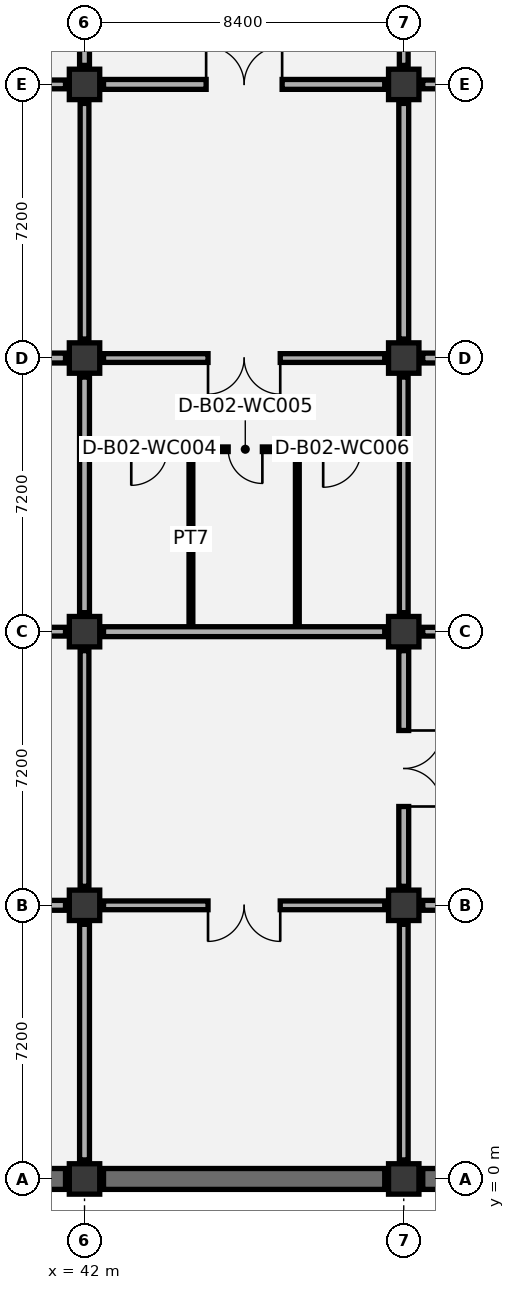
"""IFC4 building model, lengths in metres.
Left out: names, types, materials, properties, quantities, classifications, styles, units other than length and angle.
Written with IfcOpenShell. Run it as: python <this file> out.ifc"""

import sys

from ifc_helpers import new_model, si_unit, direction, frame, frame_2d, origin, origin_2d, place, context, subcontext, project, spatial, rectangle, extrude, element, fill, save


model = new_model("IFC4")
c1 = context("Model", 3, precision=1e-05, world=origin(), true_north=direction((0.0, 1.0)))
c2 = subcontext(c1, "Body", "Model", "MODEL_VIEW")
j1 = project(units=[si_unit("LENGTHUNIT", "METRE"), si_unit("PLANEANGLEUNIT", "RADIAN")], contexts=[c1])
p1 = place(None, origin())
s1 = spatial("IfcSite", under=j1, at=p1, CompositionType="ELEMENT")
p2 = place(p1, origin())
s2 = spatial("IfcBuilding", under=s1, at=p2, CompositionType="ELEMENT")
p3 = place(p2, frame((0.0, 0.0, -9.6)))
s3 = spatial("IfcBuildingStorey", under=s2, at=p3, CompositionType="ELEMENT", Elevation=-9.6)
for number, where, z_axis, x_axis in (
    (1, (42.0, 0.0, 0.0), (0.0, 0.0, 1.0), (1.0, 0.0, 0.0)),
    (2, (42.0, 7.2, 0.0), (0.0, 0.0, 1.0), (1.0, 0.0, 0.0)),
    (3, (42.0, 14.4, 0.0), (0.0, 0.0, 1.0), (1.0, 0.0, 0.0)),
    (4, (42.0, 21.6, 0.0), (0.0, 0.0, 1.0), (1.0, 0.0, 0.0)),
    (5, (42.0, 28.8, 0.0), (0.0, 0.0, 1.0), (1.0, 0.0, 0.0)),
    (6, (50.4, 0.0, 0.0), (0.0, 0.0, 1.0), (1.0, 0.0, 0.0)),
    (7, (50.4, 7.2, 0.0), (0.0, 0.0, 1.0), (1.0, 0.0, 0.0)),
    (8, (50.4, 14.4, 0.0), (0.0, 0.0, 1.0), (1.0, 0.0, 0.0)),
    (9, (50.4, 21.6, 0.0), (0.0, 0.0, 1.0), (1.0, 0.0, 0.0)),
    (10, (50.4, 28.8, 0.0), (0.0, 0.0, 1.0), (1.0, 0.0, 0.0)),
):
    element("IfcColumn", number, at=place(p3, frame(where, z_axis=z_axis, x_axis=x_axis)), inside=s3, PredefinedType="COLUMN", context=c2, shape_type="SweptSolid", body=[
        extrude(rectangle(XDim=0.8, YDim=0.8, at=origin_2d()), origin(), (0.0, 0.0, 1.0), 4.8),
    ])
for number, where, z_axis, x_axis in (
    (11, (34.1, 0.0, 0.0), (0.0, 0.0, 1.0), (1.0, 0.0, 0.0)),
    (12, (42.5, 0.0, 0.0), (0.0, 0.0, 1.0), (1.0, 0.0, 0.0)),
):
    element("IfcWall", number, at=place(p3, frame(where, z_axis=z_axis, x_axis=x_axis)), inside=s3, PredefinedType="USERDEFINED", context=c2, shape_type="SweptSolid", body=[
        extrude(rectangle(XDim=7.4, YDim=0.55, at=frame_2d((3.7, 0.0))), origin(), (0.0, 0.0, 1.0), 4.4),
    ])
p4 = place(p3, frame((50.9, 0.0, 0.0), z_axis=(0.0, 0.0, 1.0), x_axis=(1.0, 0.0, 0.0)))
e13 = element("IfcWall", 13, at=p4, inside=s3, PredefinedType="USERDEFINED", context=c2, shape_type="SweptSolid", body=[
    extrude(rectangle(XDim=7.4, YDim=0.55, at=frame_2d((3.7, 0.0))), origin(), (0.0, 0.0, 1.0), 4.4),
])
p5 = place(p3, frame((42.15, 19.2, 0.0), z_axis=(0.0, 0.0, 1.0), x_axis=(1.0, 0.0, 0.0)))
e14 = element("IfcWall", 14, at=p5, inside=s3, PredefinedType="PARTITIONING", context=c2, shape_type="SweptSolid", body=[
    extrude(rectangle(XDim=8.1, YDim=0.12, at=frame_2d((4.05, 0.0))), origin(), (0.0, 0.0, 1.0), 4.4),
])
p6 = place(p5, frame((1.08, 0.0, 0.0)))
e15 = element("IfcOpeningElement", 15, at=p6, cuts=e14, PredefinedType="OPENING", context=c2, shape_type="SweptSolid", body=[
    extrude(rectangle(XDim=0.95, YDim=2.1, at=frame_2d((0.475, 1.05))), frame((0.0, 0.07, 0.0), z_axis=(0.0, -1.0, 0.0), x_axis=(1.0, 0.0, 0.0)), (0.0, 0.0, 1.0), 0.14),
])
p7 = place(p5, frame((3.63, 0.0, 0.0)))
e16 = element("IfcOpeningElement", 16, at=p7, cuts=e14, PredefinedType="OPENING", context=c2, shape_type="SweptSolid", body=[
    extrude(rectangle(XDim=0.9, YDim=2.1, at=frame_2d((0.45, 1.05))), frame((0.0, 0.07, 0.0), z_axis=(0.0, -1.0, 0.0), x_axis=(1.0, 0.0, 0.0)), (0.0, 0.0, 1.0), 0.14),
])
p8 = place(p5, frame((6.13, 0.0, 0.0)))
e17 = element("IfcOpeningElement", 17, at=p8, cuts=e14, PredefinedType="OPENING", context=c2, shape_type="SweptSolid", body=[
    extrude(rectangle(XDim=1.0, YDim=2.1, at=frame_2d((0.5, 1.05))), frame((0.0, 0.07, 0.0), z_axis=(0.0, -1.0, 0.0), x_axis=(1.0, 0.0, 0.0)), (0.0, 0.0, 1.0), 0.14),
])
for number, where, z_axis, x_axis in (
    (18, (44.8, 14.55, 0.0), (0.0, 0.0, 1.0), (0.0, 1.0, 0.0)),
    (19, (47.6, 14.55, 0.0), (0.0, 0.0, 1.0), (0.0, 1.0, 0.0)),
):
    element("IfcWall", number, at=place(p3, frame(where, z_axis=z_axis, x_axis=x_axis)), inside=s3, PredefinedType="PARTITIONING", context=c2, shape_type="SweptSolid", body=[
        extrude(rectangle(XDim=4.59, YDim=0.1, at=frame_2d((2.295, 0.0))), origin(), (0.0, 0.0, 1.0), 4.4),
    ])
p9 = place(p3, frame((42.0, 0.5, 0.0), z_axis=(0.0, 0.0, 1.0), x_axis=(0.0, 1.0, 0.0)))
e20 = element("IfcWall", 20, at=p9, inside=s3, PredefinedType="PARTITIONING", context=c2, shape_type="SweptSolid", body=[
    extrude(rectangle(XDim=6.2, YDim=0.26, at=frame_2d((3.1, 0.0))), origin(), (0.0, 0.0, 1.0), 3.595),
])
p10 = place(p3, frame((34.1, 7.2, 0.0), z_axis=(0.0, 0.0, 1.0), x_axis=(1.0, 0.0, 0.0)))
e21 = element("IfcWall", 21, at=p10, inside=s3, PredefinedType="PARTITIONING", context=c2, shape_type="SweptSolid", body=[
    extrude(rectangle(XDim=7.4, YDim=0.26, at=frame_2d((3.7, 0.0))), origin(), (0.0, 0.0, 1.0), 3.495),
])
p11 = place(p10, frame((2.75, 0.0, 0.0)))
e22 = element("IfcOpeningElement", 22, at=p11, cuts=e21, PredefinedType="OPENING", context=c2, shape_type="SweptSolid", body=[
    extrude(rectangle(XDim=1.9, YDim=2.3, at=frame_2d((0.95, 1.15))), frame((0.0, 0.14, 0.0), z_axis=(0.0, -1.0, 0.0), x_axis=(1.0, 0.0, 0.0)), (0.0, 0.0, 1.0), 0.28),
])
p12 = place(p3, frame((42.0, 7.7, 0.0), z_axis=(0.0, 0.0, 1.0), x_axis=(0.0, 1.0, 0.0)))
e23 = element("IfcWall", 23, at=p12, inside=s3, PredefinedType="PARTITIONING", context=c2, shape_type="SweptSolid", body=[
    extrude(rectangle(XDim=6.2, YDim=0.23, at=frame_2d((3.1, 0.0))), origin(), (0.0, 0.0, 1.0), 3.595),
])
p13 = place(p3, frame((34.1, 14.4, 0.0), z_axis=(0.0, 0.0, 1.0), x_axis=(1.0, 0.0, 0.0)))
e24 = element("IfcWall", 24, at=p13, inside=s3, PredefinedType="PARTITIONING", context=c2, shape_type="SweptSolid", body=[
    extrude(rectangle(XDim=7.4, YDim=0.23, at=frame_2d((3.7, 0.0))), origin(), (0.0, 0.0, 1.0), 3.495),
])
p14 = place(p13, frame((2.7, 0.0, 0.0)))
e25 = element("IfcOpeningElement", 25, at=p14, cuts=e24, PredefinedType="OPENING", context=c2, shape_type="SweptSolid", body=[
    extrude(rectangle(XDim=2.0, YDim=2.35, at=frame_2d((1.0, 1.175))), frame((0.0, 0.125, 0.0), z_axis=(0.0, -1.0, 0.0), x_axis=(1.0, 0.0, 0.0)), (0.0, 0.0, 1.0), 0.25),
])
p15 = place(p3, frame((42.0, 14.9, 0.0), z_axis=(0.0, 0.0, 1.0), x_axis=(0.0, 1.0, 0.0)))
e26 = element("IfcWall", 26, at=p15, inside=s3, PredefinedType="PARTITIONING", context=c2, shape_type="SweptSolid", body=[
    extrude(rectangle(XDim=6.2, YDim=0.26, at=frame_2d((3.1, 0.0))), origin(), (0.0, 0.0, 1.0), 3.595),
])
p16 = place(p3, frame((34.1, 21.6, 0.0), z_axis=(0.0, 0.0, 1.0), x_axis=(1.0, 0.0, 0.0)))
e27 = element("IfcWall", 27, at=p16, inside=s3, PredefinedType="PARTITIONING", context=c2, shape_type="SweptSolid", body=[
    extrude(rectangle(XDim=7.4, YDim=0.26, at=frame_2d((3.7, 0.0))), origin(), (0.0, 0.0, 1.0), 2.995),
])
p17 = place(p16, frame((2.75, 0.0, 0.0)))
e28 = element("IfcOpeningElement", 28, at=p17, cuts=e27, PredefinedType="OPENING", context=c2, shape_type="SweptSolid", body=[
    extrude(rectangle(XDim=1.9, YDim=2.3, at=frame_2d((0.95, 1.15))), frame((0.0, 0.14, 0.0), z_axis=(0.0, -1.0, 0.0), x_axis=(1.0, 0.0, 0.0)), (0.0, 0.0, 1.0), 0.28),
])
p18 = place(p3, frame((42.0, 22.1, 0.0), z_axis=(0.0, 0.0, 1.0), x_axis=(0.0, 1.0, 0.0)))
e29 = element("IfcWall", 29, at=p18, inside=s3, PredefinedType="PARTITIONING", context=c2, shape_type="SweptSolid", body=[
    extrude(rectangle(XDim=6.2, YDim=0.23, at=frame_2d((3.1, 0.0))), origin(), (0.0, 0.0, 1.0), 3.095),
])
p19 = place(p3, frame((34.1, 28.8, 0.0), z_axis=(0.0, 0.0, 1.0), x_axis=(1.0, 0.0, 0.0)))
e30 = element("IfcWall", 30, at=p19, inside=s3, PredefinedType="PARTITIONING", context=c2, shape_type="SweptSolid", body=[
    extrude(rectangle(XDim=7.4, YDim=0.23, at=frame_2d((3.7, 0.0))), origin(), (0.0, 0.0, 1.0), 3.9),
])
p20 = place(p19, frame((2.7, 0.0, 0.0)))
e31 = element("IfcOpeningElement", 31, at=p20, cuts=e30, PredefinedType="OPENING", context=c2, shape_type="SweptSolid", body=[
    extrude(rectangle(XDim=2.0, YDim=2.35, at=frame_2d((1.0, 1.175))), frame((0.0, 0.125, 0.0), z_axis=(0.0, -1.0, 0.0), x_axis=(1.0, 0.0, 0.0)), (0.0, 0.0, 1.0), 0.25),
])
p21 = place(p3, frame((42.0, 29.3, 0.0), z_axis=(0.0, 0.0, 1.0), x_axis=(0.0, 1.0, 0.0)))
e32 = element("IfcWall", 32, at=p21, inside=s3, PredefinedType="PARTITIONING", context=c2, shape_type="SweptSolid", body=[
    extrude(rectangle(XDim=6.2, YDim=0.26, at=frame_2d((3.1, 0.0))), origin(), (0.0, 0.0, 1.0), 3.095),
])
p22 = place(p21, frame((2.15, 0.0, 0.0)))
e33 = element("IfcOpeningElement", 33, at=p22, cuts=e32, PredefinedType="OPENING", context=c2, shape_type="SweptSolid", body=[
    extrude(rectangle(XDim=1.9, YDim=2.3, at=frame_2d((0.95, 1.15))), frame((0.0, 0.14, 0.0), z_axis=(0.0, -1.0, 0.0), x_axis=(1.0, 0.0, 0.0)), (0.0, 0.0, 1.0), 0.28),
])
p23 = place(p3, frame((50.4, 0.5, 0.0), z_axis=(0.0, 0.0, 1.0), x_axis=(0.0, 1.0, 0.0)))
e34 = element("IfcWall", 34, at=p23, inside=s3, PredefinedType="PARTITIONING", context=c2, shape_type="SweptSolid", body=[
    extrude(rectangle(XDim=6.2, YDim=0.23, at=frame_2d((3.1, 0.0))), origin(), (0.0, 0.0, 1.0), 3.595),
])
p24 = place(p3, frame((42.5, 7.2, 0.0), z_axis=(0.0, 0.0, 1.0), x_axis=(1.0, 0.0, 0.0)))
e35 = element("IfcWall", 35, at=p24, inside=s3, PredefinedType="PARTITIONING", context=c2, shape_type="SweptSolid", body=[
    extrude(rectangle(XDim=7.4, YDim=0.23, at=frame_2d((3.7, 0.0))), origin(), (0.0, 0.0, 1.0), 3.495),
])
p25 = place(p24, frame((2.75, 0.0, 0.0)))
e36 = element("IfcOpeningElement", 36, at=p25, cuts=e35, PredefinedType="OPENING", context=c2, shape_type="SweptSolid", body=[
    extrude(rectangle(XDim=1.9, YDim=2.3, at=frame_2d((0.95, 1.15))), frame((0.0, 0.125, 0.0), z_axis=(0.0, -1.0, 0.0), x_axis=(1.0, 0.0, 0.0)), (0.0, 0.0, 1.0), 0.25),
])
p26 = place(p3, frame((50.4, 7.7, 0.0), z_axis=(0.0, 0.0, 1.0), x_axis=(0.0, 1.0, 0.0)))
e37 = element("IfcWall", 37, at=p26, inside=s3, PredefinedType="PARTITIONING", context=c2, shape_type="SweptSolid", body=[
    extrude(rectangle(XDim=6.2, YDim=0.26, at=frame_2d((3.1, 0.0))), origin(), (0.0, 0.0, 1.0), 3.595),
])
p27 = place(p26, frame((2.1, 0.0, 0.0)))
e38 = element("IfcOpeningElement", 38, at=p27, cuts=e37, PredefinedType="OPENING", context=c2, shape_type="SweptSolid", body=[
    extrude(rectangle(XDim=2.0, YDim=2.35, at=frame_2d((1.0, 1.175))), frame((0.0, 0.14, 0.0), z_axis=(0.0, -1.0, 0.0), x_axis=(1.0, 0.0, 0.0)), (0.0, 0.0, 1.0), 0.28),
])
p28 = place(p3, frame((42.5, 14.4, 0.0), z_axis=(0.0, 0.0, 1.0), x_axis=(1.0, 0.0, 0.0)))
e39 = element("IfcWall", 39, at=p28, inside=s3, PredefinedType="PARTITIONING", context=c2, shape_type="SweptSolid", body=[
    extrude(rectangle(XDim=7.4, YDim=0.26, at=frame_2d((3.7, 0.0))), origin(), (0.0, 0.0, 1.0), 3.495),
])
p29 = place(p3, frame((50.4, 14.9, 0.0), z_axis=(0.0, 0.0, 1.0), x_axis=(0.0, 1.0, 0.0)))
e40 = element("IfcWall", 40, at=p29, inside=s3, PredefinedType="PARTITIONING", context=c2, shape_type="SweptSolid", body=[
    extrude(rectangle(XDim=6.2, YDim=0.23, at=frame_2d((3.1, 0.0))), origin(), (0.0, 0.0, 1.0), 3.595),
])
p30 = place(p3, frame((42.5, 21.6, 0.0), z_axis=(0.0, 0.0, 1.0), x_axis=(1.0, 0.0, 0.0)))
e41 = element("IfcWall", 41, at=p30, inside=s3, PredefinedType="PARTITIONING", context=c2, shape_type="SweptSolid", body=[
    extrude(rectangle(XDim=7.4, YDim=0.23, at=frame_2d((3.7, 0.0))), origin(), (0.0, 0.0, 1.0), 3.495),
])
p31 = place(p30, frame((2.75, 0.0, 0.0)))
e42 = element("IfcOpeningElement", 42, at=p31, cuts=e41, PredefinedType="OPENING", context=c2, shape_type="SweptSolid", body=[
    extrude(rectangle(XDim=1.9, YDim=2.3, at=frame_2d((0.95, 1.15))), frame((0.0, 0.125, 0.0), z_axis=(0.0, -1.0, 0.0), x_axis=(1.0, 0.0, 0.0)), (0.0, 0.0, 1.0), 0.25),
])
p32 = place(p3, frame((50.4, 22.1, 0.0), z_axis=(0.0, 0.0, 1.0), x_axis=(0.0, 1.0, 0.0)))
e43 = element("IfcWall", 43, at=p32, inside=s3, PredefinedType="PARTITIONING", context=c2, shape_type="SweptSolid", body=[
    extrude(rectangle(XDim=6.2, YDim=0.26, at=frame_2d((3.1, 0.0))), origin(), (0.0, 0.0, 1.0), 3.595),
])
p33 = place(p3, frame((42.5, 28.8, 0.0), z_axis=(0.0, 0.0, 1.0), x_axis=(1.0, 0.0, 0.0)))
e44 = element("IfcWall", 44, at=p33, inside=s3, PredefinedType="PARTITIONING", context=c2, shape_type="SweptSolid", body=[
    extrude(rectangle(XDim=7.4, YDim=0.26, at=frame_2d((3.7, 0.0))), origin(), (0.0, 0.0, 1.0), 3.495),
])
p34 = place(p33, frame((2.7, 0.0, 0.0)))
e45 = element("IfcOpeningElement", 45, at=p34, cuts=e44, PredefinedType="OPENING", context=c2, shape_type="SweptSolid", body=[
    extrude(rectangle(XDim=2.0, YDim=2.35, at=frame_2d((1.0, 1.175))), frame((0.0, 0.14, 0.0), z_axis=(0.0, -1.0, 0.0), x_axis=(1.0, 0.0, 0.0)), (0.0, 0.0, 1.0), 0.28),
])
p35 = place(p3, frame((50.4, 29.3, 0.0), z_axis=(0.0, 0.0, 1.0), x_axis=(0.0, 1.0, 0.0)))
e46 = element("IfcWall", 46, at=p35, inside=s3, PredefinedType="PARTITIONING", context=c2, shape_type="SweptSolid", body=[
    extrude(rectangle(XDim=6.2, YDim=0.23, at=frame_2d((3.1, 0.0))), origin(), (0.0, 0.0, 1.0), 3.595),
])
p36 = place(p35, frame((2.15, 0.0, 0.0)))
e47 = element("IfcOpeningElement", 47, at=p36, cuts=e46, PredefinedType="OPENING", context=c2, shape_type="SweptSolid", body=[
    extrude(rectangle(XDim=1.9, YDim=2.3, at=frame_2d((0.95, 1.15))), frame((0.0, 0.125, 0.0), z_axis=(0.0, -1.0, 0.0), x_axis=(1.0, 0.0, 0.0)), (0.0, 0.0, 1.0), 0.25),
])
p37 = place(p3, frame((50.9, 7.2, 0.0), z_axis=(0.0, 0.0, 1.0), x_axis=(1.0, 0.0, 0.0)))
e48 = element("IfcWall", 48, at=p37, inside=s3, PredefinedType="PARTITIONING", context=c2, shape_type="SweptSolid", body=[
    extrude(rectangle(XDim=7.4, YDim=0.26, at=frame_2d((3.7, 0.0))), origin(), (0.0, 0.0, 1.0), 3.495),
])
p38 = place(p37, frame((2.75, 0.0, 0.0)))
e49 = element("IfcOpeningElement", 49, at=p38, cuts=e48, PredefinedType="OPENING", context=c2, shape_type="SweptSolid", body=[
    extrude(rectangle(XDim=1.9, YDim=2.3, at=frame_2d((0.95, 1.15))), frame((0.0, 0.14, 0.0), z_axis=(0.0, -1.0, 0.0), x_axis=(1.0, 0.0, 0.0)), (0.0, 0.0, 1.0), 0.28),
])
p39 = place(p3, frame((50.9, 14.4, 0.0), z_axis=(0.0, 0.0, 1.0), x_axis=(1.0, 0.0, 0.0)))
e50 = element("IfcWall", 50, at=p39, inside=s3, PredefinedType="PARTITIONING", context=c2, shape_type="SweptSolid", body=[
    extrude(rectangle(XDim=7.4, YDim=0.23, at=frame_2d((3.7, 0.0))), origin(), (0.0, 0.0, 1.0), 3.495),
])
p40 = place(p39, frame((2.7, 0.0, 0.0)))
e51 = element("IfcOpeningElement", 51, at=p40, cuts=e50, PredefinedType="OPENING", context=c2, shape_type="SweptSolid", body=[
    extrude(rectangle(XDim=2.0, YDim=2.35, at=frame_2d((1.0, 1.175))), frame((0.0, 0.125, 0.0), z_axis=(0.0, -1.0, 0.0), x_axis=(1.0, 0.0, 0.0)), (0.0, 0.0, 1.0), 0.25),
])
p41 = place(p3, frame((50.9, 21.6, 0.0), z_axis=(0.0, 0.0, 1.0), x_axis=(1.0, 0.0, 0.0)))
e52 = element("IfcWall", 52, at=p41, inside=s3, PredefinedType="PARTITIONING", context=c2, shape_type="SweptSolid", body=[
    extrude(rectangle(XDim=7.4, YDim=0.26, at=frame_2d((3.7, 0.0))), origin(), (0.0, 0.0, 1.0), 3.495),
])
p42 = place(p41, frame((2.75, 0.0, 0.0)))
e53 = element("IfcOpeningElement", 53, at=p42, cuts=e52, PredefinedType="OPENING", context=c2, shape_type="SweptSolid", body=[
    extrude(rectangle(XDim=1.9, YDim=2.3, at=frame_2d((0.95, 1.15))), frame((0.0, 0.14, 0.0), z_axis=(0.0, -1.0, 0.0), x_axis=(1.0, 0.0, 0.0)), (0.0, 0.0, 1.0), 0.28),
])
p43 = place(p3, frame((50.9, 28.8, 0.0), z_axis=(0.0, 0.0, 1.0), x_axis=(1.0, 0.0, 0.0)))
e54 = element("IfcWall", 54, at=p43, inside=s3, PredefinedType="PARTITIONING", context=c2, shape_type="SweptSolid", body=[
    extrude(rectangle(XDim=7.4, YDim=0.23, at=frame_2d((3.7, 0.0))), origin(), (0.0, 0.0, 1.0), 3.495),
])
p44 = place(p43, frame((2.7, 0.0, 0.0)))
e55 = element("IfcOpeningElement", 55, at=p44, cuts=e54, PredefinedType="OPENING", context=c2, shape_type="SweptSolid", body=[
    extrude(rectangle(XDim=2.0, YDim=2.35, at=frame_2d((1.0, 1.175))), frame((0.0, 0.125, 0.0), z_axis=(0.0, -1.0, 0.0), x_axis=(1.0, 0.0, 0.0)), (0.0, 0.0, 1.0), 0.25),
])
p45 = place(p6, frame((0.95, 0.0, 0.0), z_axis=(0.0, 0.0, 1.0), x_axis=(-1.0, 0.0, 0.0)))
e56 = element("IfcDoor", 56, at=p45, inside=s3, OperationType="SINGLE_SWING_RIGHT", PredefinedType="DOOR", context=c2, shape_type="SweptSolid", body=[
    extrude(rectangle(XDim=0.95, YDim=2.1, at=frame_2d((0.475, 1.05))), frame((0.0, 0.025, 0.0), z_axis=(0.0, -1.0, 0.0), x_axis=(1.0, 0.0, 0.0)), (0.0, 0.0, 1.0), 0.05),
])
fill(e15, e56)
p46 = place(p7, frame((0.9, 0.0, 0.0), z_axis=(0.0, 0.0, 1.0), x_axis=(-1.0, 0.0, 0.0)))
e57 = element("IfcDoor", 57, at=p46, inside=s3, OperationType="SINGLE_SWING_LEFT", PredefinedType="DOOR", context=c2, shape_type="SweptSolid", body=[
    extrude(rectangle(XDim=0.9, YDim=2.1, at=frame_2d((0.45, 1.05))), frame((0.0, 0.025, 0.0), z_axis=(0.0, -1.0, 0.0), x_axis=(1.0, 0.0, 0.0)), (0.0, 0.0, 1.0), 0.05),
])
fill(e16, e57)
p47 = place(p8, frame((1.0, 0.0, 0.0), z_axis=(0.0, 0.0, 1.0), x_axis=(-1.0, 0.0, 0.0)))
e58 = element("IfcDoor", 58, at=p47, inside=s3, OperationType="SINGLE_SWING_RIGHT", PredefinedType="DOOR", context=c2, shape_type="SweptSolid", body=[
    extrude(rectangle(XDim=1.0, YDim=2.1, at=frame_2d((0.5, 1.05))), frame((0.0, 0.025, 0.0), z_axis=(0.0, -1.0, 0.0), x_axis=(1.0, 0.0, 0.0)), (0.0, 0.0, 1.0), 0.05),
])
fill(e17, e58)
p48 = place(p25, frame((1.9, 0.0, 0.0), z_axis=(0.0, 0.0, 1.0), x_axis=(-1.0, 0.0, 0.0)))
e59 = element("IfcDoor", 59, at=p48, inside=s3, OperationType="DOUBLE_DOOR_SINGLE_SWING", PredefinedType="DOOR", context=c2, shape_type="SweptSolid", body=[
    extrude(rectangle(XDim=1.9, YDim=2.3, at=frame_2d((0.95, 1.15))), frame((0.0, 0.025, 0.0), z_axis=(0.0, -1.0, 0.0), x_axis=(1.0, 0.0, 0.0)), (0.0, 0.0, 1.0), 0.05),
])
fill(e36, e59)
p49 = place(p27, frame((2.0, 0.0, 0.0), z_axis=(0.0, 0.0, 1.0), x_axis=(-1.0, 0.0, 0.0)))
e60 = element("IfcDoor", 60, at=p49, inside=s3, OperationType="DOUBLE_DOOR_SINGLE_SWING", PredefinedType="DOOR", context=c2, shape_type="SweptSolid", body=[
    extrude(rectangle(XDim=2.0, YDim=2.35, at=frame_2d((1.0, 1.175))), frame((0.0, 0.025, 0.0), z_axis=(0.0, -1.0, 0.0), x_axis=(1.0, 0.0, 0.0)), (0.0, 0.0, 1.0), 0.05),
])
fill(e38, e60)
p50 = place(p31, frame((1.9, 0.0, 0.0), z_axis=(0.0, 0.0, 1.0), x_axis=(-1.0, 0.0, 0.0)))
e61 = element("IfcDoor", 61, at=p50, inside=s3, OperationType="DOUBLE_DOOR_SINGLE_SWING", PredefinedType="DOOR", context=c2, shape_type="SweptSolid", body=[
    extrude(rectangle(XDim=1.9, YDim=2.3, at=frame_2d((0.95, 1.15))), frame((0.0, 0.025, 0.0), z_axis=(0.0, -1.0, 0.0), x_axis=(1.0, 0.0, 0.0)), (0.0, 0.0, 1.0), 0.05),
])
fill(e42, e61)
p51 = place(p34, origin())
e62 = element("IfcDoor", 62, at=p51, inside=s3, OperationType="DOUBLE_DOOR_SINGLE_SWING", PredefinedType="DOOR", context=c2, shape_type="SweptSolid", body=[
    extrude(rectangle(XDim=2.0, YDim=2.35, at=frame_2d((1.0, 1.175))), frame((0.0, 0.025, 0.0), z_axis=(0.0, -1.0, 0.0), x_axis=(1.0, 0.0, 0.0)), (0.0, 0.0, 1.0), 0.05),
])
fill(e45, e62)
save(model, sys.argv[1])
